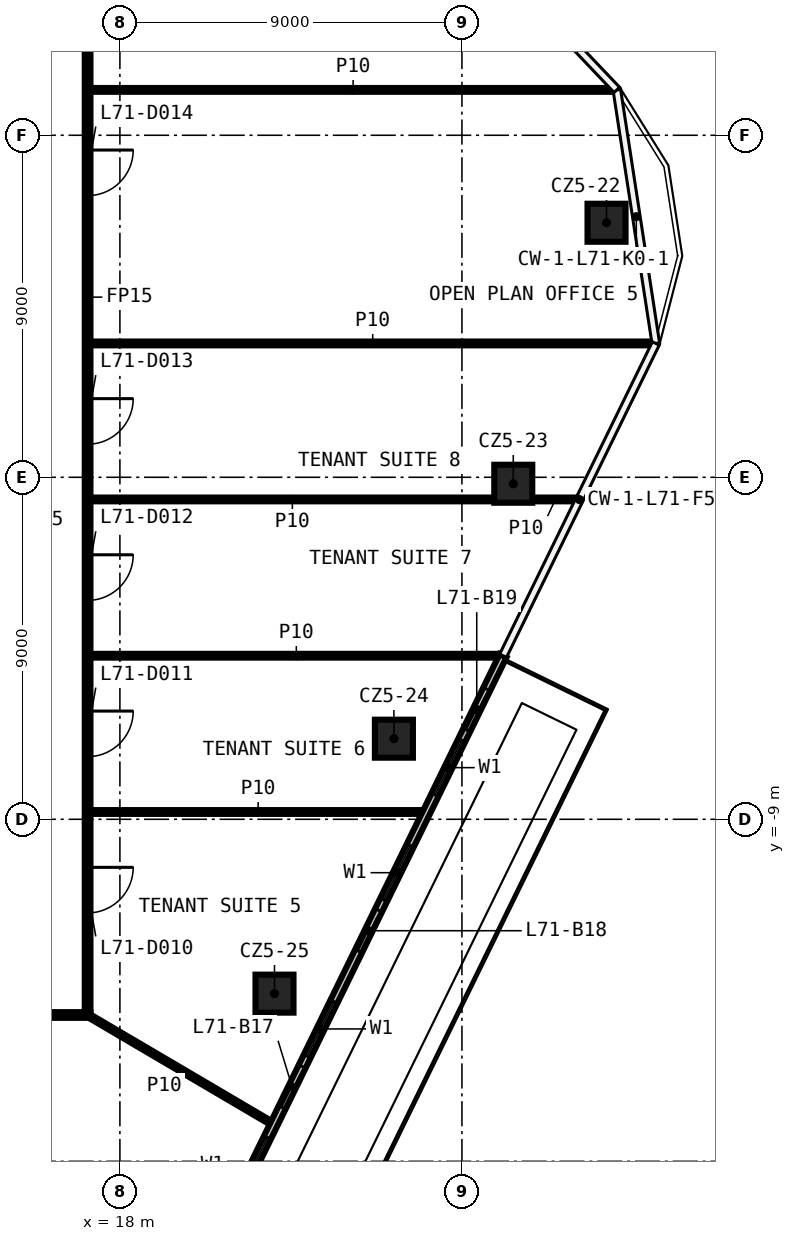
"""IFC4 building model, lengths in metres.
Left out: names, types, materials, properties, quantities, classifications, styles, units other than length and angle.
Written with IfcOpenShell. Run it as: python <this file> out.ifc"""

import sys

from ifc_helpers import new_model, si_unit, direction, frame, frame_2d, origin, origin_2d, place, context, subcontext, project, spatial, rectangle, extrude, element, fill, save


model = new_model("IFC4")
c1 = context("Model", 3, precision=1e-05, world=origin(), true_north=direction((0.0, 1.0)))
c2 = subcontext(c1, "Body", "Model", "MODEL_VIEW")
j1 = project(units=[si_unit("LENGTHUNIT", "METRE"), si_unit("PLANEANGLEUNIT", "RADIAN")], contexts=[c1])
p1 = place(None, origin())
s1 = spatial("IfcSite", under=j1, at=p1, CompositionType="ELEMENT")
p2 = place(p1, origin())
s2 = spatial("IfcBuilding", under=s1, at=p2, CompositionType="ELEMENT")
p3 = place(p2, frame((0.0, 0.0, 332.0)))
s3 = spatial("IfcBuildingStorey", under=s2, at=p3, CompositionType="ELEMENT", Elevation=332.0)
for number, where, z_axis, x_axis in (
    (1, (30.805, 6.698, 0.0), (0.0, 0.0, 1.0), (1.0, 0.0, 0.0)),
    (2, (28.351, -0.17, 0.0), (0.0, 0.0, 1.0), (1.0, 0.0, 0.0)),
    (3, (25.21, -6.879, 0.0), (0.0, 0.0, 1.0), (1.0, 0.0, 0.0)),
    (4, (22.068, -13.588, 0.0), (0.0, 0.0, 1.0), (1.0, 0.0, 0.0)),
):
    element("IfcColumn", number, at=place(p3, frame(where, z_axis=z_axis, x_axis=x_axis)), inside=s3, PredefinedType="COLUMN", context=c2, shape_type="SweptSolid", body=[
        extrude(rectangle(XDim=1.0, YDim=1.0, at=origin_2d()), origin(), (0.0, 0.0, 1.0), 3.82),
    ])
p4 = place(p3, frame((17.225, -14.15, 0.0), z_axis=(0.0, 0.0, 1.0), x_axis=(-1.0, 0.0, 0.0)))
e5 = element("IfcWall", 5, at=p4, inside=s3, PredefinedType="PARTITIONING", context=c2, shape_type="SweptSolid", body=[
    extrude(rectangle(XDim=34.45, YDim=0.15, at=frame_2d((17.225, 0.0))), origin(), (0.0, 0.0, 1.0), 3.82),
])
p5 = place(p4, frame((24.639, 0.0, 0.0)))
e6 = element("IfcOpeningElement", 6, at=p5, cuts=e5, PredefinedType="OPENING", context=c2, shape_type="SweptSolid", body=[
    extrude(rectangle(XDim=1.2, YDim=2.1, at=frame_2d((0.6, 1.05))), frame((0.0, 0.085, 0.0), z_axis=(0.0, -1.0, 0.0), x_axis=(1.0, 0.0, 0.0)), (0.0, 0.0, 1.0), 0.17),
])
p6 = place(p4, frame((20.005, 0.0, 0.0)))
e7 = element("IfcOpeningElement", 7, at=p6, cuts=e5, PredefinedType="OPENING", context=c2, shape_type="SweptSolid", body=[
    extrude(rectangle(XDim=1.2, YDim=2.1, at=frame_2d((0.6, 1.05))), frame((0.0, 0.085, 0.0), z_axis=(0.0, -1.0, 0.0), x_axis=(1.0, 0.0, 0.0)), (0.0, 0.0, 1.0), 0.17),
])
p7 = place(p4, frame((15.367, 0.0, 0.0)))
e8 = element("IfcOpeningElement", 8, at=p7, cuts=e5, PredefinedType="OPENING", context=c2, shape_type="SweptSolid", body=[
    extrude(rectangle(XDim=1.2, YDim=2.1, at=frame_2d((0.6, 1.05))), frame((0.0, 0.085, 0.0), z_axis=(0.0, -1.0, 0.0), x_axis=(1.0, 0.0, 0.0)), (0.0, 0.0, 1.0), 0.17),
])
p8 = place(p4, frame((10.73, 0.0, 0.0)))
e9 = element("IfcOpeningElement", 9, at=p8, cuts=e5, PredefinedType="OPENING", context=c2, shape_type="SweptSolid", body=[
    extrude(rectangle(XDim=1.2, YDim=2.1, at=frame_2d((0.6, 1.05))), frame((0.0, 0.085, 0.0), z_axis=(0.0, -1.0, 0.0), x_axis=(1.0, 0.0, 0.0)), (0.0, 0.0, 1.0), 0.17),
])
p9 = place(p4, frame((6.097, 0.0, 0.0)))
e10 = element("IfcOpeningElement", 10, at=p9, cuts=e5, PredefinedType="OPENING", context=c2, shape_type="SweptSolid", body=[
    extrude(rectangle(XDim=1.2, YDim=2.1, at=frame_2d((0.6, 1.05))), frame((0.0, 0.085, 0.0), z_axis=(0.0, -1.0, 0.0), x_axis=(1.0, 0.0, 0.0)), (0.0, 0.0, 1.0), 0.17),
])
p10 = place(p4, frame((1.83, 0.0, 0.0)))
e11 = element("IfcOpeningElement", 11, at=p10, cuts=e5, PredefinedType="OPENING", context=c2, shape_type="SweptSolid", body=[
    extrude(rectangle(XDim=1.2, YDim=2.1, at=frame_2d((0.6, 1.05))), frame((0.0, 0.085, 0.0), z_axis=(0.0, -1.0, 0.0), x_axis=(1.0, 0.0, 0.0)), (0.0, 0.0, 1.0), 0.17),
])
p11 = place(p3, frame((17.225, -8.808, 0.0), z_axis=(0.0, 0.0, 1.0), x_axis=(1.0, 0.0, 0.0)))
e12 = element("IfcWall", 12, at=p11, inside=s3, PredefinedType="PARTITIONING", context=c2, shape_type="SweptSolid", body=[
    extrude(rectangle(XDim=8.824, YDim=0.1, at=frame_2d((4.412, 0.0))), origin(), (0.0, 0.0, 1.0), 3.82),
])
p12 = place(p3, frame((17.225, -4.696, 0.0), z_axis=(0.0, 0.0, 1.0), x_axis=(1.0, 0.0, 0.0)))
e13 = element("IfcWall", 13, at=p12, inside=s3, PredefinedType="PARTITIONING", context=c2, shape_type="SweptSolid", body=[
    extrude(rectangle(XDim=10.835, YDim=0.1, at=frame_2d((5.417, 0.0))), origin(), (0.0, 0.0, 1.0), 3.82),
])
p13 = place(p3, frame((17.225, -0.583, 0.0), z_axis=(0.0, 0.0, 1.0), x_axis=(1.0, 0.0, 0.0)))
e14 = element("IfcWall", 14, at=p13, inside=s3, PredefinedType="PARTITIONING", context=c2, shape_type="SweptSolid", body=[
    extrude(rectangle(XDim=10.626, YDim=0.1, at=frame_2d((5.313, 0.0))), origin(), (0.0, 0.0, 1.0), 3.82),
])
p14 = place(p3, frame((28.851, -0.583, 0.0), z_axis=(0.0, 0.0, 1.0), x_axis=(1.0, 0.0, 0.0)))
e15 = element("IfcWall", 15, at=p14, inside=s3, PredefinedType="PARTITIONING", context=c2, shape_type="SweptSolid", body=[
    extrude(rectangle(XDim=1.221, YDim=0.1, at=frame_2d((0.611, 0.0))), origin(), (0.0, 0.0, 1.0), 3.82),
])
p15 = place(p3, frame((17.225, 3.522, 0.0), z_axis=(0.0, 0.0, 1.0), x_axis=(1.0, 0.0, 0.0)))
e16 = element("IfcWall", 16, at=p15, inside=s3, PredefinedType="PARTITIONING", context=c2, shape_type="SweptSolid", body=[
    extrude(rectangle(XDim=14.854, YDim=0.1, at=frame_2d((7.427, 0.0))), origin(), (0.0, 0.0, 1.0), 3.82),
])
p16 = place(p3, frame((17.225, 10.194, 0.0), z_axis=(0.0, 0.0, 1.0), x_axis=(1.0, 0.0, 0.0)))
e17 = element("IfcWall", 17, at=p16, inside=s3, PredefinedType="PARTITIONING", context=c2, shape_type="SweptSolid", body=[
    extrude(rectangle(XDim=13.823, YDim=0.1, at=frame_2d((6.912, 0.0))), origin(), (0.0, 0.0, 1.0), 3.82),
])
p17 = place(p3, frame((17.15, 14.075, 0.0), z_axis=(0.0, 0.0, 1.0), x_axis=(0.0, -1.0, 0.0)))
e18 = element("IfcWall", 18, at=p17, inside=s3, PredefinedType="PARTITIONING", context=c2, shape_type="SweptSolid", body=[
    extrude(rectangle(XDim=28.15, YDim=0.15, at=frame_2d((14.075, 0.0))), origin(), (0.0, 0.0, 1.0), 3.82),
])
p18 = place(p17, frame((24.339, 0.0, 0.0)))
e19 = element("IfcOpeningElement", 19, at=p18, cuts=e18, PredefinedType="OPENING", context=c2, shape_type="SweptSolid", body=[
    extrude(rectangle(XDim=1.2, YDim=2.1, at=frame_2d((0.6, 1.05))), frame((0.0, 0.085, 0.0), z_axis=(0.0, -1.0, 0.0), x_axis=(1.0, 0.0, 0.0)), (0.0, 0.0, 1.0), 0.17),
])
p19 = place(p17, frame((20.227, 0.0, 0.0)))
e20 = element("IfcOpeningElement", 20, at=p19, cuts=e18, PredefinedType="OPENING", context=c2, shape_type="SweptSolid", body=[
    extrude(rectangle(XDim=1.2, YDim=2.1, at=frame_2d((0.6, 1.05))), frame((0.0, 0.085, 0.0), z_axis=(0.0, -1.0, 0.0), x_axis=(1.0, 0.0, 0.0)), (0.0, 0.0, 1.0), 0.17),
])
p20 = place(p17, frame((16.115, 0.0, 0.0)))
e21 = element("IfcOpeningElement", 21, at=p20, cuts=e18, PredefinedType="OPENING", context=c2, shape_type="SweptSolid", body=[
    extrude(rectangle(XDim=1.2, YDim=2.1, at=frame_2d((0.6, 1.05))), frame((0.0, 0.085, 0.0), z_axis=(0.0, -1.0, 0.0), x_axis=(1.0, 0.0, 0.0)), (0.0, 0.0, 1.0), 0.17),
])
p21 = place(p17, frame((12.006, 0.0, 0.0)))
e22 = element("IfcOpeningElement", 22, at=p21, cuts=e18, PredefinedType="OPENING", context=c2, shape_type="SweptSolid", body=[
    extrude(rectangle(XDim=1.2, YDim=2.1, at=frame_2d((0.6, 1.05))), frame((0.0, 0.085, 0.0), z_axis=(0.0, -1.0, 0.0), x_axis=(1.0, 0.0, 0.0)), (0.0, 0.0, 1.0), 0.17),
])
p22 = place(p17, frame((5.464, 0.0, 0.0)))
e23 = element("IfcOpeningElement", 23, at=p22, cuts=e18, PredefinedType="OPENING", context=c2, shape_type="SweptSolid", body=[
    extrude(rectangle(XDim=1.2, YDim=2.1, at=frame_2d((0.6, 1.05))), frame((0.0, 0.085, 0.0), z_axis=(0.0, -1.0, 0.0), x_axis=(1.0, 0.0, 0.0)), (0.0, 0.0, 1.0), 0.17),
])
p23 = place(p17, frame((1.569, 0.0, 0.0)))
e24 = element("IfcOpeningElement", 24, at=p23, cuts=e18, PredefinedType="OPENING", context=c2, shape_type="SweptSolid", body=[
    extrude(rectangle(XDim=1.2, YDim=2.1, at=frame_2d((0.6, 1.05))), frame((0.0, 0.085, 0.0), z_axis=(0.0, -1.0, 0.0), x_axis=(1.0, 0.0, 0.0)), (0.0, 0.0, 1.0), 0.17),
])
p24 = place(p3, frame((17.15, -14.15, 0.0), z_axis=(0.0, 0.0, 1.0), x_axis=(0.861895432603, -0.507086051137, 0.0)))
e25 = element("IfcWall", 25, at=p24, inside=s3, PredefinedType="PARTITIONING", context=c2, shape_type="SweptSolid", body=[
    extrude(rectangle(XDim=5.664, YDim=0.1, at=frame_2d((2.832, 0.0))), origin(), (0.0, 0.0, 1.0), 3.82),
])
p25 = place(p3, frame((18.027, -25.256, 0.0), z_axis=(0.0, 0.0, 1.0), x_axis=(0.439336781314, 0.898322432418, 0.0)))
e26 = element("IfcWall", 26, at=p25, inside=s3, PredefinedType="SOLIDWALL", context=c2, shape_type="SweptSolid", body=[
    extrude(rectangle(XDim=22.887, YDim=0.2, at=frame_2d((11.444, 0.0))), origin(), (0.0, 0.0, 1.0), 3.82),
])
p26 = place(p25, frame((2.0, 0.0, 0.6)))
e27 = element("IfcOpeningElement", 27, at=p26, cuts=e26, PredefinedType="OPENING", context=c2, shape_type="SweptSolid", body=[
    extrude(rectangle(XDim=1.6, YDim=2.4, at=frame_2d((0.8, 1.2))), frame((0.0, 0.11, 0.0), z_axis=(0.0, -1.0, 0.0), x_axis=(1.0, 0.0, 0.0)), (0.0, 0.0, 1.0), 0.22),
])
p27 = place(p25, frame((0.5, 0.0, 0.0)))
e28 = element("IfcOpeningElement", 28, at=p27, cuts=e26, PredefinedType="OPENING", context=c2, shape_type="SweptSolid", body=[
    extrude(rectangle(XDim=1.2, YDim=2.4, at=frame_2d((0.6, 1.2))), frame((0.0, 0.11, 0.0), z_axis=(0.0, -1.0, 0.0), x_axis=(1.0, 0.0, 0.0)), (0.0, 0.0, 1.0), 0.22),
])
p28 = place(p25, frame((7.177, 0.0, 0.6)))
e29 = element("IfcOpeningElement", 29, at=p28, cuts=e26, PredefinedType="OPENING", context=c2, shape_type="SweptSolid", body=[
    extrude(rectangle(XDim=1.6, YDim=2.4, at=frame_2d((0.8, 1.2))), frame((0.0, 0.11, 0.0), z_axis=(0.0, -1.0, 0.0), x_axis=(1.0, 0.0, 0.0)), (0.0, 0.0, 1.0), 0.22),
])
p29 = place(p25, frame((5.677, 0.0, 0.0)))
e30 = element("IfcOpeningElement", 30, at=p29, cuts=e26, PredefinedType="OPENING", context=c2, shape_type="SweptSolid", body=[
    extrude(rectangle(XDim=1.2, YDim=2.4, at=frame_2d((0.6, 1.2))), frame((0.0, 0.11, 0.0), z_axis=(0.0, -1.0, 0.0), x_axis=(1.0, 0.0, 0.0)), (0.0, 0.0, 1.0), 0.22),
])
p30 = place(p25, frame((11.155, 0.0, 0.6)))
e31 = element("IfcOpeningElement", 31, at=p30, cuts=e26, PredefinedType="OPENING", context=c2, shape_type="SweptSolid", body=[
    extrude(rectangle(XDim=1.6, YDim=2.4, at=frame_2d((0.8, 1.2))), frame((0.0, 0.11, 0.0), z_axis=(0.0, -1.0, 0.0), x_axis=(1.0, 0.0, 0.0)), (0.0, 0.0, 1.0), 0.22),
])
p31 = place(p25, frame((9.655, 0.0, 0.0)))
e32 = element("IfcOpeningElement", 32, at=p31, cuts=e26, PredefinedType="OPENING", context=c2, shape_type="SweptSolid", body=[
    extrude(rectangle(XDim=1.2, YDim=2.4, at=frame_2d((0.6, 1.2))), frame((0.0, 0.11, 0.0), z_axis=(0.0, -1.0, 0.0), x_axis=(1.0, 0.0, 0.0)), (0.0, 0.0, 1.0), 0.22),
])
p32 = place(p25, frame((15.732, 0.0, 0.6)))
e33 = element("IfcOpeningElement", 33, at=p32, cuts=e26, PredefinedType="OPENING", context=c2, shape_type="SweptSolid", body=[
    extrude(rectangle(XDim=1.6, YDim=2.4, at=frame_2d((0.8, 1.2))), frame((0.0, 0.11, 0.0), z_axis=(0.0, -1.0, 0.0), x_axis=(1.0, 0.0, 0.0)), (0.0, 0.0, 1.0), 0.22),
])
p33 = place(p25, frame((14.232, 0.0, 0.0)))
e34 = element("IfcOpeningElement", 34, at=p33, cuts=e26, PredefinedType="OPENING", context=c2, shape_type="SweptSolid", body=[
    extrude(rectangle(XDim=1.2, YDim=2.4, at=frame_2d((0.6, 1.2))), frame((0.0, 0.11, 0.0), z_axis=(0.0, -1.0, 0.0), x_axis=(1.0, 0.0, 0.0)), (0.0, 0.0, 1.0), 0.22),
])
p34 = place(p25, frame((18.81, 0.0, 0.6)))
e35 = element("IfcOpeningElement", 35, at=p34, cuts=e26, PredefinedType="OPENING", context=c2, shape_type="SweptSolid", body=[
    extrude(rectangle(XDim=1.6, YDim=2.4, at=frame_2d((0.8, 1.2))), frame((0.0, 0.11, 0.0), z_axis=(0.0, -1.0, 0.0), x_axis=(1.0, 0.0, 0.0)), (0.0, 0.0, 1.0), 0.22),
])
p35 = place(p25, frame((20.71, 0.0, 0.0)))
e36 = element("IfcOpeningElement", 36, at=p35, cuts=e26, PredefinedType="OPENING", context=c2, shape_type="SweptSolid", body=[
    extrude(rectangle(XDim=1.2, YDim=2.4, at=frame_2d((0.6, 1.2))), frame((0.0, 0.11, 0.0), z_axis=(0.0, -1.0, 0.0), x_axis=(1.0, 0.0, 0.0)), (0.0, 0.0, 1.0), 0.22),
])
p36 = place(p18, origin())
e37 = element("IfcDoor", 37, at=p36, inside=s3, OperationType="SINGLE_SWING_LEFT", PredefinedType="DOOR", context=c2, shape_type="SweptSolid", body=[
    extrude(rectangle(XDim=1.2, YDim=2.1, at=frame_2d((0.6, 1.05))), frame((0.0, 0.025, 0.0), z_axis=(0.0, -1.0, 0.0), x_axis=(1.0, 0.0, 0.0)), (0.0, 0.0, 1.0), 0.05),
])
fill(e19, e37)
p37 = place(p19, origin())
e38 = element("IfcDoor", 38, at=p37, inside=s3, OperationType="SINGLE_SWING_RIGHT", PredefinedType="DOOR", context=c2, shape_type="SweptSolid", body=[
    extrude(rectangle(XDim=1.2, YDim=2.1, at=frame_2d((0.6, 1.05))), frame((0.0, 0.025, 0.0), z_axis=(0.0, -1.0, 0.0), x_axis=(1.0, 0.0, 0.0)), (0.0, 0.0, 1.0), 0.05),
])
fill(e20, e38)
p38 = place(p20, origin())
e39 = element("IfcDoor", 39, at=p38, inside=s3, OperationType="SINGLE_SWING_LEFT", PredefinedType="DOOR", context=c2, shape_type="SweptSolid", body=[
    extrude(rectangle(XDim=1.2, YDim=2.1, at=frame_2d((0.6, 1.05))), frame((0.0, 0.025, 0.0), z_axis=(0.0, -1.0, 0.0), x_axis=(1.0, 0.0, 0.0)), (0.0, 0.0, 1.0), 0.05),
])
fill(e21, e39)
p39 = place(p21, origin())
e40 = element("IfcDoor", 40, at=p39, inside=s3, OperationType="SINGLE_SWING_RIGHT", PredefinedType="DOOR", context=c2, shape_type="SweptSolid", body=[
    extrude(rectangle(XDim=1.2, YDim=2.1, at=frame_2d((0.6, 1.05))), frame((0.0, 0.025, 0.0), z_axis=(0.0, -1.0, 0.0), x_axis=(1.0, 0.0, 0.0)), (0.0, 0.0, 1.0), 0.05),
])
fill(e22, e40)
p40 = place(p22, origin())
e41 = element("IfcDoor", 41, at=p40, inside=s3, OperationType="SINGLE_SWING_LEFT", PredefinedType="DOOR", context=c2, shape_type="SweptSolid", body=[
    extrude(rectangle(XDim=1.2, YDim=2.1, at=frame_2d((0.6, 1.05))), frame((0.0, 0.025, 0.0), z_axis=(0.0, -1.0, 0.0), x_axis=(1.0, 0.0, 0.0)), (0.0, 0.0, 1.0), 0.05),
])
fill(e23, e41)
p41 = place(p28, origin())
e42 = element("IfcWindow", 42, at=p41, inside=s3, PartitioningType="SINGLE_PANEL", PredefinedType="WINDOW", context=c2, shape_type="SweptSolid", body=[
    extrude(rectangle(XDim=1.6, YDim=2.4, at=frame_2d((0.8, 1.2))), frame((0.0, 0.03, 0.0), z_axis=(0.0, -1.0, 0.0), x_axis=(1.0, 0.0, 0.0)), (0.0, 0.0, 1.0), 0.06),
])
fill(e29, e42)
p42 = place(p30, origin())
e43 = element("IfcWindow", 43, at=p42, inside=s3, PartitioningType="SINGLE_PANEL", PredefinedType="WINDOW", context=c2, shape_type="SweptSolid", body=[
    extrude(rectangle(XDim=1.6, YDim=2.4, at=frame_2d((0.8, 1.2))), frame((0.0, 0.03, 0.0), z_axis=(0.0, -1.0, 0.0), x_axis=(1.0, 0.0, 0.0)), (0.0, 0.0, 1.0), 0.06),
])
fill(e31, e43)
p43 = place(p31, origin())
e44 = element("IfcDoor", 44, at=p43, inside=s3, OperationType="SLIDING_TO_LEFT", PredefinedType="DOOR", context=c2, shape_type="SweptSolid", body=[
    extrude(rectangle(XDim=1.2, YDim=2.4, at=frame_2d((0.6, 1.2))), frame((0.0, 0.025, 0.0), z_axis=(0.0, -1.0, 0.0), x_axis=(1.0, 0.0, 0.0)), (0.0, 0.0, 1.0), 0.05),
])
fill(e32, e44)
p44 = place(p32, origin())
e45 = element("IfcWindow", 45, at=p44, inside=s3, PartitioningType="SINGLE_PANEL", PredefinedType="WINDOW", context=c2, shape_type="SweptSolid", body=[
    extrude(rectangle(XDim=1.6, YDim=2.4, at=frame_2d((0.8, 1.2))), frame((0.0, 0.03, 0.0), z_axis=(0.0, -1.0, 0.0), x_axis=(1.0, 0.0, 0.0)), (0.0, 0.0, 1.0), 0.06),
])
fill(e33, e45)
p45 = place(p33, origin())
e46 = element("IfcDoor", 46, at=p45, inside=s3, OperationType="SLIDING_TO_LEFT", PredefinedType="DOOR", context=c2, shape_type="SweptSolid", body=[
    extrude(rectangle(XDim=1.2, YDim=2.4, at=frame_2d((0.6, 1.2))), frame((0.0, 0.025, 0.0), z_axis=(0.0, -1.0, 0.0), x_axis=(1.0, 0.0, 0.0)), (0.0, 0.0, 1.0), 0.05),
])
fill(e34, e46)
p46 = place(p34, origin())
e47 = element("IfcWindow", 47, at=p46, inside=s3, PartitioningType="SINGLE_PANEL", PredefinedType="WINDOW", context=c2, shape_type="SweptSolid", body=[
    extrude(rectangle(XDim=1.6, YDim=2.4, at=frame_2d((0.8, 1.2))), frame((0.0, 0.03, 0.0), z_axis=(0.0, -1.0, 0.0), x_axis=(1.0, 0.0, 0.0)), (0.0, 0.0, 1.0), 0.06),
])
fill(e35, e47)
p47 = place(p35, origin())
e48 = element("IfcDoor", 48, at=p47, inside=s3, OperationType="SLIDING_TO_LEFT", PredefinedType="DOOR", context=c2, shape_type="SweptSolid", body=[
    extrude(rectangle(XDim=1.2, YDim=2.4, at=frame_2d((0.6, 1.2))), frame((0.0, 0.025, 0.0), z_axis=(0.0, -1.0, 0.0), x_axis=(1.0, 0.0, 0.0)), (0.0, 0.0, 1.0), 0.05),
])
fill(e36, e48)
save(model, sys.argv[1])
